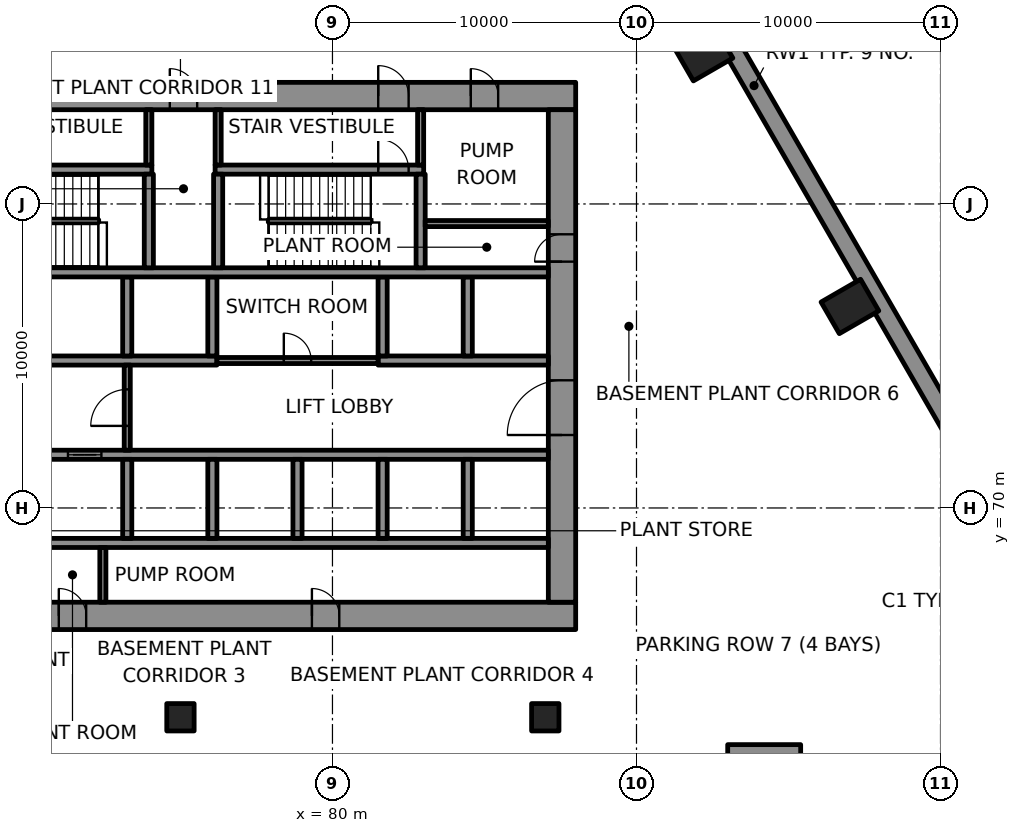
"""IFC4 building model, lengths in metres.
Left out: names, types, materials, properties, quantities, classifications, styles, units other than length and angle.
Written with IfcOpenShell. Run it as: python <this file> out.ifc"""

import sys

from ifc_helpers import new_model, si_unit, direction, frame, frame_2d, origin, origin_2d, place, context, subcontext, project, spatial, rectangle, extrude, element, fill, save


model = new_model("IFC4")
c1 = context("Model", 3, precision=1e-05, world=origin(), true_north=direction((0.0, 1.0)))
c2 = subcontext(c1, "Body", "Model", "MODEL_VIEW")
j1 = project(units=[si_unit("LENGTHUNIT", "METRE"), si_unit("PLANEANGLEUNIT", "RADIAN")], contexts=[c1])
p1 = place(None, origin())
s1 = spatial("IfcSite", under=j1, at=p1, CompositionType="ELEMENT")
p2 = place(p1, origin())
s2 = spatial("IfcBuilding", under=s1, at=p2, CompositionType="ELEMENT")
p3 = place(p2, frame((0.0, 0.0, -9.5)))
s3 = spatial("IfcBuildingStorey", under=s2, at=p3, CompositionType="ELEMENT", Elevation=-9.5)
p4 = place(p3, frame((109.132, 57.451, -0.35), z_axis=(0.0, 0.0, 1.0), x_axis=(-0.499999206999, 0.866025861623, 0.0)))
e1 = element("IfcWall", 1, at=p4, inside=s3, PredefinedType="SOLIDWALL", context=c2, shape_type="SweptSolid", body=[
    extrude(rectangle(XDim=61.064, YDim=0.6, at=frame_2d((30.532, 0.0))), origin(), (0.0, 0.0, 1.0), 4.5),
])
p5 = place(p3, frame((94.2, 54.215, -0.35), z_axis=(0.0, 0.0, 1.0), x_axis=(0.0, 1.0, 0.0)))
e2 = element("IfcWall", 2, at=p5, inside=s3, PredefinedType="SHEAR", context=c2, shape_type="SweptSolid", body=[
    extrude(rectangle(XDim=8.0, YDim=2.4, at=frame_2d((4.0, 0.0))), origin(), (0.0, 0.0, 1.0), 4.5),
])
for number, where, z_axis, x_axis in (
    (3, (97.021, 76.628, 0.0), (0.0, 0.0, 1.0), (-0.5, 0.866, 0.0)),
    (4, (92.22, 84.942, 0.0), (0.0, 0.0, 1.0), (-0.5, 0.866, 0.0)),
):
    element("IfcColumn", number, at=place(p3, frame(where, z_axis=z_axis, x_axis=x_axis)), inside=s3, PredefinedType="COLUMN", context=c2, shape_type="SweptSolid", body=[
        extrude(rectangle(XDim=1.2, YDim=1.5, at=origin_2d()), origin(), (0.0, 0.0, 1.0), 4.5),
    ])
for number, where, z_axis, x_axis in (
    (5, (75.0, 63.115, 0.0), (0.0, 0.0, 1.0), (1.0, 0.0, 0.0)),
    (6, (87.0, 63.115, 0.0), (0.0, 0.0, 1.0), (1.0, 0.0, 0.0)),
):
    element("IfcColumn", number, at=place(p3, frame(where, z_axis=z_axis, x_axis=x_axis)), inside=s3, PredefinedType="COLUMN", context=c2, shape_type="SweptSolid", body=[
        extrude(rectangle(XDim=0.9, YDim=0.9, at=origin_2d()), origin(), (0.0, 0.0, 1.0), 4.5),
    ])
p6 = place(p3, frame((62.0, 66.45, 0.0), z_axis=(0.0, 0.0, 1.0), x_axis=(1.0, 0.0, 0.0)))
e7 = element("IfcWall", 7, at=p6, inside=s3, PredefinedType="SHEAR", context=c2, shape_type="SweptSolid", body=[
    extrude(rectangle(XDim=26.0, YDim=0.9, at=frame_2d((13.0, 0.0))), origin(), (0.0, 0.0, 1.0), 4.15),
])
p7 = place(p6, frame((3.45, 0.0, 0.0)))
e8 = element("IfcOpeningElement", 8, at=p7, cuts=e7, PredefinedType="OPENING", context=c2, shape_type="SweptSolid", body=[
    extrude(rectangle(XDim=0.9, YDim=2.1, at=frame_2d((0.45, 1.05))), frame((0.0, 0.46, 0.0), z_axis=(0.0, -1.0, 0.0), x_axis=(1.0, 0.0, 0.0)), (0.0, 0.0, 1.0), 0.92),
])
p8 = place(p6, frame((5.637, 0.0, 0.0)))
e9 = element("IfcOpeningElement", 9, at=p8, cuts=e7, PredefinedType="OPENING", context=c2, shape_type="SweptSolid", body=[
    extrude(rectangle(XDim=0.9, YDim=2.1, at=frame_2d((0.45, 1.05))), frame((0.0, 0.46, 0.0), z_axis=(0.0, -1.0, 0.0), x_axis=(1.0, 0.0, 0.0)), (0.0, 0.0, 1.0), 0.92),
])
p9 = place(p6, frame((7.212, 0.0, 0.0)))
e10 = element("IfcOpeningElement", 10, at=p9, cuts=e7, PredefinedType="OPENING", context=c2, shape_type="SweptSolid", body=[
    extrude(rectangle(XDim=0.9, YDim=2.1, at=frame_2d((0.45, 1.05))), frame((0.0, 0.46, 0.0), z_axis=(0.0, -1.0, 0.0), x_axis=(1.0, 0.0, 0.0)), (0.0, 0.0, 1.0), 0.92),
])
p10 = place(p6, frame((8.999, 0.0, 0.0)))
e11 = element("IfcOpeningElement", 11, at=p10, cuts=e7, PredefinedType="OPENING", context=c2, shape_type="SweptSolid", body=[
    extrude(rectangle(XDim=0.9, YDim=2.1, at=frame_2d((0.45, 1.05))), frame((0.0, 0.46, 0.0), z_axis=(0.0, -1.0, 0.0), x_axis=(1.0, 0.0, 0.0)), (0.0, 0.0, 1.0), 0.92),
])
p11 = place(p6, frame((17.324, 0.0, 0.0)))
e12 = element("IfcOpeningElement", 12, at=p11, cuts=e7, PredefinedType="OPENING", context=c2, shape_type="SweptSolid", body=[
    extrude(rectangle(XDim=0.9, YDim=2.1, at=frame_2d((0.45, 1.05))), frame((0.0, 0.46, 0.0), z_axis=(0.0, -1.0, 0.0), x_axis=(1.0, 0.0, 0.0)), (0.0, 0.0, 1.0), 0.92),
])
p12 = place(p3, frame((62.0, 83.55, 0.0), z_axis=(0.0, 0.0, 1.0), x_axis=(1.0, 0.0, 0.0)))
e13 = element("IfcWall", 13, at=p12, inside=s3, PredefinedType="SHEAR", context=c2, shape_type="SweptSolid", body=[
    extrude(rectangle(XDim=26.0, YDim=0.9, at=frame_2d((13.0, 0.0))), origin(), (0.0, 0.0, 1.0), 4.15),
])
p13 = place(p12, frame((5.695, 0.0, 0.0)))
e14 = element("IfcOpeningElement", 14, at=p13, cuts=e13, PredefinedType="OPENING", context=c2, shape_type="SweptSolid", body=[
    extrude(rectangle(XDim=1.0, YDim=2.1, at=frame_2d((0.5, 1.05))), frame((0.0, 0.46, 0.0), z_axis=(0.0, -1.0, 0.0), x_axis=(1.0, 0.0, 0.0)), (0.0, 0.0, 1.0), 0.92),
])
p14 = place(p12, frame((19.505, 0.0, 0.0)))
e15 = element("IfcOpeningElement", 15, at=p14, cuts=e13, PredefinedType="OPENING", context=c2, shape_type="SweptSolid", body=[
    extrude(rectangle(XDim=1.0, YDim=2.1, at=frame_2d((0.5, 1.05))), frame((0.0, 0.46, 0.0), z_axis=(0.0, -1.0, 0.0), x_axis=(1.0, 0.0, 0.0)), (0.0, 0.0, 1.0), 0.92),
])
p15 = place(p12, frame((3.45, 0.0, 0.0)))
e16 = element("IfcOpeningElement", 16, at=p15, cuts=e13, PredefinedType="OPENING", context=c2, shape_type="SweptSolid", body=[
    extrude(rectangle(XDim=0.9, YDim=2.1, at=frame_2d((0.45, 1.05))), frame((0.0, 0.46, 0.0), z_axis=(0.0, -1.0, 0.0), x_axis=(1.0, 0.0, 0.0)), (0.0, 0.0, 1.0), 0.92),
])
p16 = place(p12, frame((12.65, 0.0, 0.0)))
e17 = element("IfcOpeningElement", 17, at=p16, cuts=e13, PredefinedType="OPENING", context=c2, shape_type="SweptSolid", body=[
    extrude(rectangle(XDim=0.9, YDim=2.1, at=frame_2d((0.45, 1.05))), frame((0.0, 0.46, 0.0), z_axis=(0.0, -1.0, 0.0), x_axis=(1.0, 0.0, 0.0)), (0.0, 0.0, 1.0), 0.92),
])
p17 = place(p12, frame((22.55, 0.0, 0.0)))
e18 = element("IfcOpeningElement", 18, at=p17, cuts=e13, PredefinedType="OPENING", context=c2, shape_type="SweptSolid", body=[
    extrude(rectangle(XDim=0.9, YDim=2.1, at=frame_2d((0.45, 1.05))), frame((0.0, 0.46, 0.0), z_axis=(0.0, -1.0, 0.0), x_axis=(1.0, 0.0, 0.0)), (0.0, 0.0, 1.0), 0.92),
])
p18 = place(p3, frame((87.55, 66.9, 0.0), z_axis=(0.0, 0.0, 1.0), x_axis=(0.0, 1.0, 0.0)))
e19 = element("IfcWall", 19, at=p18, inside=s3, PredefinedType="SHEAR", context=c2, shape_type="SweptSolid", body=[
    extrude(rectangle(XDim=16.2, YDim=0.9, at=frame_2d((8.1, 0.0))), origin(), (0.0, 0.0, 1.0), 4.15),
])
p19 = place(p18, frame((5.5, 0.0, 0.0)))
e20 = element("IfcOpeningElement", 20, at=p19, cuts=e19, PredefinedType="OPENING", context=c2, shape_type="SweptSolid", body=[
    extrude(rectangle(XDim=1.8, YDim=2.1, at=frame_2d((0.9, 1.05))), frame((0.0, 0.46, 0.0), z_axis=(0.0, -1.0, 0.0), x_axis=(1.0, 0.0, 0.0)), (0.0, 0.0, 1.0), 0.92),
])
p20 = place(p18, frame((11.202, 0.0, 0.0)))
e21 = element("IfcOpeningElement", 21, at=p20, cuts=e19, PredefinedType="OPENING", context=c2, shape_type="SweptSolid", body=[
    extrude(rectangle(XDim=0.9, YDim=2.1, at=frame_2d((0.45, 1.05))), frame((0.0, 0.46, 0.0), z_axis=(0.0, -1.0, 0.0), x_axis=(1.0, 0.0, 0.0)), (0.0, 0.0, 1.0), 0.92),
])
p21 = place(p3, frame((70.35, 68.85, 0.0), z_axis=(0.0, 0.0, 1.0), x_axis=(1.0, 0.0, 0.0)))
e22 = element("IfcWall", 22, at=p21, inside=s3, PredefinedType="SHEAR", context=c2, shape_type="SweptSolid", body=[
    extrude(rectangle(XDim=16.75, YDim=0.3, at=frame_2d((8.375, 0.0))), origin(), (0.0, 0.0, 1.0), 4.15),
])
p22 = place(p3, frame((70.3, 71.75, 0.0), z_axis=(0.0, 0.0, 1.0), x_axis=(1.0, 0.0, 0.0)))
e23 = element("IfcWall", 23, at=p22, inside=s3, PredefinedType="SHEAR", context=c2, shape_type="SweptSolid", body=[
    extrude(rectangle(XDim=16.8, YDim=0.3, at=frame_2d((8.4, 0.0))), origin(), (0.0, 0.0, 1.0), 4.15),
])
p23 = place(p22, frame((1.0, 0.0, 0.0)))
e24 = element("IfcOpeningElement", 24, at=p23, cuts=e23, PredefinedType="OPENING", context=c2, shape_type="SweptSolid", body=[
    extrude(rectangle(XDim=1.1, YDim=2.1, at=frame_2d((0.55, 1.05))), frame((0.0, 0.16, 0.0), z_axis=(0.0, -1.0, 0.0), x_axis=(1.0, 0.0, 0.0)), (0.0, 0.0, 1.0), 0.32),
])
p24 = place(p3, frame((70.3, 74.85, 0.0), z_axis=(0.0, 0.0, 1.0), x_axis=(1.0, 0.0, 0.0)))
e25 = element("IfcWall", 25, at=p24, inside=s3, PredefinedType="SHEAR", context=c2, shape_type="SweptSolid", body=[
    extrude(rectangle(XDim=5.9, YDim=0.3, at=frame_2d((2.95, 0.0))), origin(), (0.0, 0.0, 1.0), 4.15),
])
p25 = place(p3, frame((81.5, 74.85, 0.0), z_axis=(0.0, 0.0, 1.0), x_axis=(1.0, 0.0, 0.0)))
e26 = element("IfcWall", 26, at=p25, inside=s3, PredefinedType="SHEAR", context=c2, shape_type="SweptSolid", body=[
    extrude(rectangle(XDim=5.6, YDim=0.3, at=frame_2d((2.8, 0.0))), origin(), (0.0, 0.0, 1.0), 4.15),
])
for number, where, z_axis, x_axis in (
    (27, (73.25, 69.0, 0.0), (0.0, 0.0, 1.0), (0.0, 1.0, 0.0)),
    (28, (73.25, 75.0, 0.0), (0.0, 0.0, 1.0), (0.0, 1.0, 0.0)),
    (29, (76.05, 69.0, 0.0), (0.0, 0.0, 1.0), (0.0, 1.0, 0.0)),
    (30, (76.05, 75.0, 0.0), (0.0, 0.0, 1.0), (0.0, 1.0, 0.0)),
    (31, (78.85, 69.0, 0.0), (0.0, 0.0, 1.0), (0.0, 1.0, 0.0)),
    (32, (81.65, 69.0, 0.0), (0.0, 0.0, 1.0), (0.0, 1.0, 0.0)),
    (33, (81.65, 75.0, 0.0), (0.0, 0.0, 1.0), (0.0, 1.0, 0.0)),
    (34, (84.45, 69.0, 0.0), (0.0, 0.0, 1.0), (0.0, 1.0, 0.0)),
    (35, (84.45, 75.0, 0.0), (0.0, 0.0, 1.0), (0.0, 1.0, 0.0)),
):
    element("IfcWall", number, at=place(p3, frame(where, z_axis=z_axis, x_axis=x_axis)), inside=s3, PredefinedType="SHEAR", context=c2, shape_type="SweptSolid", body=[
        extrude(rectangle(XDim=2.6, YDim=0.3, at=frame_2d((1.3, 0.0))), origin(), (0.0, 0.0, 1.0), 4.15),
    ])
p26 = place(p3, frame((67.15, 77.75, 0.0), z_axis=(0.0, 0.0, 1.0), x_axis=(1.0, 0.0, 0.0)))
e36 = element("IfcWall", 36, at=p26, inside=s3, PredefinedType="SHEAR", context=c2, shape_type="SweptSolid", body=[
    extrude(rectangle(XDim=19.95, YDim=0.3, at=frame_2d((9.975, 0.0))), origin(), (0.0, 0.0, 1.0), 4.15),
])
p27 = place(p26, frame((0.545, 0.0, 0.0)))
e37 = element("IfcOpeningElement", 37, at=p27, cuts=e36, PredefinedType="OPENING", context=c2, shape_type="SweptSolid", body=[
    extrude(rectangle(XDim=1.0, YDim=2.1, at=frame_2d((0.5, 1.05))), frame((0.0, 0.16, 0.0), z_axis=(0.0, -1.0, 0.0), x_axis=(1.0, 0.0, 0.0)), (0.0, 0.0, 1.0), 0.32),
])
p28 = place(p3, frame((67.15, 81.13, 0.0), z_axis=(0.0, 0.0, 1.0), x_axis=(1.0, 0.0, 0.0)))
e38 = element("IfcWall", 38, at=p28, inside=s3, PredefinedType="SHEAR", context=c2, shape_type="SweptSolid", body=[
    extrude(rectangle(XDim=6.91, YDim=0.3, at=frame_2d((3.455, 0.0))), origin(), (0.0, 0.0, 1.0), 4.15),
])
p29 = place(p28, frame((0.545, 0.0, 0.0)))
e39 = element("IfcOpeningElement", 39, at=p29, cuts=e38, PredefinedType="OPENING", context=c2, shape_type="SweptSolid", body=[
    extrude(rectangle(XDim=1.0, YDim=2.1, at=frame_2d((0.5, 1.05))), frame((0.0, 0.16, 0.0), z_axis=(0.0, -1.0, 0.0), x_axis=(1.0, 0.0, 0.0)), (0.0, 0.0, 1.0), 0.32),
])
p30 = place(p3, frame((76.14, 81.13, 0.0), z_axis=(0.0, 0.0, 1.0), x_axis=(1.0, 0.0, 0.0)))
e40 = element("IfcWall", 40, at=p30, inside=s3, PredefinedType="SHEAR", context=c2, shape_type="SweptSolid", body=[
    extrude(rectangle(XDim=6.86, YDim=0.3, at=frame_2d((3.43, 0.0))), origin(), (0.0, 0.0, 1.0), 4.15),
])
p31 = place(p30, frame((5.365, 0.0, 0.0)))
e41 = element("IfcOpeningElement", 41, at=p31, cuts=e40, PredefinedType="OPENING", context=c2, shape_type="SweptSolid", body=[
    extrude(rectangle(XDim=1.0, YDim=2.1, at=frame_2d((0.5, 1.05))), frame((0.0, 0.16, 0.0), z_axis=(0.0, -1.0, 0.0), x_axis=(1.0, 0.0, 0.0)), (0.0, 0.0, 1.0), 0.32),
])
for number, where, z_axis, x_axis in (
    (42, (73.96, 77.9, 0.0), (0.0, 0.0, 1.0), (0.0, 1.0, 0.0)),
    (43, (76.24, 77.9, 0.0), (0.0, 0.0, 1.0), (0.0, 1.0, 0.0)),
    (44, (82.9, 77.9, 0.0), (0.0, 0.0, 1.0), (0.0, 1.0, 0.0)),
):
    element("IfcWall", number, at=place(p3, frame(where, z_axis=z_axis, x_axis=x_axis)), inside=s3, PredefinedType="SHEAR", context=c2, shape_type="SweptSolid", body=[
        extrude(rectangle(XDim=3.08, YDim=0.3, at=frame_2d((1.54, 0.0))), origin(), (0.0, 0.0, 1.0), 4.15),
    ])
p32 = place(p3, frame((76.2, 74.85, 0.0), z_axis=(0.0, 0.0, 1.0), x_axis=(1.0, 0.0, 0.0)))
e45 = element("IfcWall", 45, at=p32, inside=s3, PredefinedType="PARTITIONING", context=c2, shape_type="SweptSolid", body=[
    extrude(rectangle(XDim=5.3, YDim=0.2, at=frame_2d((2.65, 0.0))), origin(), (0.0, 0.0, 1.0), 4.15),
])
p33 = place(p32, frame((2.2, 0.0, 0.0)))
e46 = element("IfcOpeningElement", 46, at=p33, cuts=e45, PredefinedType="OPENING", context=c2, shape_type="SweptSolid", body=[
    extrude(rectangle(XDim=0.9, YDim=2.1, at=frame_2d((0.45, 1.05))), frame((0.0, 0.11, 0.0), z_axis=(0.0, -1.0, 0.0), x_axis=(1.0, 0.0, 0.0)), (0.0, 0.0, 1.0), 0.22),
])
p34 = place(p3, frame((83.05, 79.355, 0.0), z_axis=(0.0, 0.0, 1.0), x_axis=(1.0, 0.0, 0.0)))
e47 = element("IfcWall", 47, at=p34, inside=s3, PredefinedType="PARTITIONING", context=c2, shape_type="SweptSolid", body=[
    extrude(rectangle(XDim=4.05, YDim=0.2, at=frame_2d((2.025, 0.0))), origin(), (0.0, 0.0, 1.0), 4.15),
])
p35 = place(p3, frame((72.448, 66.9, 0.0), z_axis=(0.0, 0.0, 1.0), x_axis=(0.0, 1.0, 0.0)))
e48 = element("IfcWall", 48, at=p35, inside=s3, PredefinedType="PARTITIONING", context=c2, shape_type="SweptSolid", body=[
    extrude(rectangle(XDim=1.8, YDim=0.2, at=frame_2d((0.9, 0.0))), origin(), (0.0, 0.0, 1.0), 4.15),
])
p36 = place(p3, frame((73.25, 71.9, 0.0), z_axis=(0.0, 0.0, 1.0), x_axis=(0.0, 1.0, 0.0)))
e49 = element("IfcWall", 49, at=p36, inside=s3, PredefinedType="PARTITIONING", context=c2, shape_type="SweptSolid", body=[
    extrude(rectangle(XDim=2.8, YDim=0.2, at=frame_2d((1.4, 0.0))), origin(), (0.0, 0.0, 1.0), 4.15),
])
p37 = place(p36, frame((0.8, 0.0, 0.0)))
e50 = element("IfcOpeningElement", 50, at=p37, cuts=e49, PredefinedType="OPENING", context=c2, shape_type="SweptSolid", body=[
    extrude(rectangle(XDim=1.2, YDim=2.1, at=frame_2d((0.6, 1.05))), frame((0.0, 0.11, 0.0), z_axis=(0.0, -1.0, 0.0), x_axis=(1.0, 0.0, 0.0)), (0.0, 0.0, 1.0), 0.22),
])
for number, where, z_axis, x_axis in (
    (51, (73.96, 81.28, 0.0), (0.0, 0.0, 1.0), (0.0, 1.0, 0.0)),
    (52, (76.24, 81.28, 0.0), (0.0, 0.0, 1.0), (0.0, 1.0, 0.0)),
    (53, (82.9, 81.28, 0.0), (0.0, 0.0, 1.0), (0.0, 1.0, 0.0)),
):
    element("IfcWall", number, at=place(p3, frame(where, z_axis=z_axis, x_axis=x_axis)), inside=s3, PredefinedType="PARTITIONING", context=c2, shape_type="SweptSolid", body=[
        extrude(rectangle(XDim=1.82, YDim=0.2, at=frame_2d((0.91, 0.0))), origin(), (0.0, 0.0, 1.0), 4.15),
    ])
p38 = place(p23, origin())
e54 = element("IfcDoor", 54, at=p38, inside=s3, OperationType="DOUBLE_DOOR_SLIDING", PredefinedType="DOOR", context=c2, shape_type="SweptSolid", body=[
    extrude(rectangle(XDim=1.1, YDim=2.1, at=frame_2d((0.55, 1.05))), frame((0.0, 0.025, 0.0), z_axis=(0.0, -1.0, 0.0), x_axis=(1.0, 0.0, 0.0)), (0.0, 0.0, 1.0), 0.05),
])
fill(e24, e54)
p39 = place(p31, origin())
e55 = element("IfcDoor", 55, at=p39, inside=s3, OperationType="SINGLE_SWING_RIGHT", PredefinedType="DOOR", context=c2, shape_type="SweptSolid", body=[
    extrude(rectangle(XDim=1.0, YDim=2.1, at=frame_2d((0.5, 1.05))), frame((0.0, 0.025, 0.0), z_axis=(0.0, -1.0, 0.0), x_axis=(1.0, 0.0, 0.0)), (0.0, 0.0, 1.0), 0.05),
])
fill(e41, e55)
p40 = place(p14, origin())
e56 = element("IfcDoor", 56, at=p40, inside=s3, OperationType="SINGLE_SWING_LEFT", PredefinedType="DOOR", context=c2, shape_type="SweptSolid", body=[
    extrude(rectangle(XDim=1.0, YDim=2.1, at=frame_2d((0.5, 1.05))), frame((0.0, 0.17, 0.0), z_axis=(0.0, -1.0, 0.0), x_axis=(1.0, 0.0, 0.0)), (0.0, 0.0, 1.0), 0.34),
])
fill(e15, e56)
p41 = place(p37, origin())
e57 = element("IfcDoor", 57, at=p41, inside=s3, OperationType="SINGLE_SWING_LEFT", PredefinedType="DOOR", context=c2, shape_type="SweptSolid", body=[
    extrude(rectangle(XDim=1.2, YDim=2.1, at=frame_2d((0.6, 1.05))), frame((0.0, 0.025, 0.0), z_axis=(0.0, -1.0, 0.0), x_axis=(1.0, 0.0, 0.0)), (0.0, 0.0, 1.0), 0.05),
])
fill(e50, e57)
p42 = place(p19, origin())
e58 = element("IfcDoor", 58, at=p42, inside=s3, OperationType="SINGLE_SWING_RIGHT", PredefinedType="DOOR", context=c2, shape_type="SweptSolid", body=[
    extrude(rectangle(XDim=1.8, YDim=2.1, at=frame_2d((0.9, 1.05))), frame((0.0, 0.17, 0.0), z_axis=(0.0, -1.0, 0.0), x_axis=(1.0, 0.0, 0.0)), (0.0, 0.0, 1.0), 0.34),
])
fill(e20, e58)
p43 = place(p10, origin())
e59 = element("IfcDoor", 59, at=p43, inside=s3, OperationType="SINGLE_SWING_RIGHT", PredefinedType="DOOR", context=c2, shape_type="SweptSolid", body=[
    extrude(rectangle(XDim=0.9, YDim=2.1, at=frame_2d((0.45, 1.05))), frame((0.0, 0.17, 0.0), z_axis=(0.0, -1.0, 0.0), x_axis=(1.0, 0.0, 0.0)), (0.0, 0.0, 1.0), 0.34),
])
fill(e11, e59)
p44 = place(p11, origin())
e60 = element("IfcDoor", 60, at=p44, inside=s3, OperationType="SINGLE_SWING_LEFT", PredefinedType="DOOR", context=c2, shape_type="SweptSolid", body=[
    extrude(rectangle(XDim=0.9, YDim=2.1, at=frame_2d((0.45, 1.05))), frame((0.0, 0.17, 0.0), z_axis=(0.0, -1.0, 0.0), x_axis=(1.0, 0.0, 0.0)), (0.0, 0.0, 1.0), 0.34),
])
fill(e12, e60)
p45 = place(p33, origin())
e61 = element("IfcDoor", 61, at=p45, inside=s3, OperationType="SINGLE_SWING_LEFT", PredefinedType="DOOR", context=c2, shape_type="SweptSolid", body=[
    extrude(rectangle(XDim=0.9, YDim=2.1, at=frame_2d((0.45, 1.05))), frame((0.0, 0.025, 0.0), z_axis=(0.0, -1.0, 0.0), x_axis=(1.0, 0.0, 0.0)), (0.0, 0.0, 1.0), 0.05),
])
fill(e46, e61)
p46 = place(p16, origin())
e62 = element("IfcDoor", 62, at=p46, inside=s3, OperationType="SINGLE_SWING_RIGHT", PredefinedType="DOOR", context=c2, shape_type="SweptSolid", body=[
    extrude(rectangle(XDim=0.9, YDim=2.1, at=frame_2d((0.45, 1.05))), frame((0.0, 0.17, 0.0), z_axis=(0.0, -1.0, 0.0), x_axis=(1.0, 0.0, 0.0)), (0.0, 0.0, 1.0), 0.34),
])
fill(e17, e62)
p47 = place(p20, origin())
e63 = element("IfcDoor", 63, at=p47, inside=s3, OperationType="SINGLE_SWING_LEFT", PredefinedType="DOOR", context=c2, shape_type="SweptSolid", body=[
    extrude(rectangle(XDim=0.9, YDim=2.1, at=frame_2d((0.45, 1.05))), frame((0.0, 0.17, 0.0), z_axis=(0.0, -1.0, 0.0), x_axis=(1.0, 0.0, 0.0)), (0.0, 0.0, 1.0), 0.34),
])
fill(e21, e63)
p48 = place(p17, origin())
e64 = element("IfcDoor", 64, at=p48, inside=s3, OperationType="SINGLE_SWING_RIGHT", PredefinedType="DOOR", context=c2, shape_type="SweptSolid", body=[
    extrude(rectangle(XDim=0.9, YDim=2.1, at=frame_2d((0.45, 1.05))), frame((0.0, 0.17, 0.0), z_axis=(0.0, -1.0, 0.0), x_axis=(1.0, 0.0, 0.0)), (0.0, 0.0, 1.0), 0.34),
])
fill(e18, e64)
save(model, sys.argv[1])
